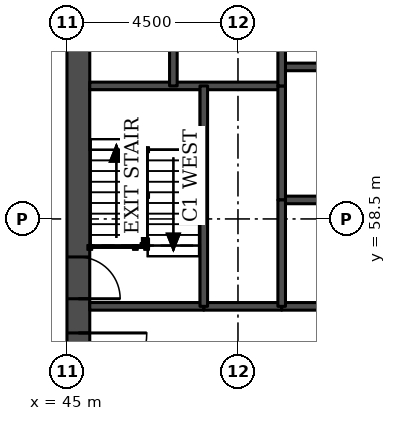
"""IFC4 building model, lengths in metres.
Left out: names, types, materials, properties, quantities, classifications, styles, units other than length and angle.
Written with IfcOpenShell. Run it as: python <this file> out.ifc"""

import sys

from ifc_helpers import new_model, si_unit, direction, frame, frame_2d, origin, place, context, subcontext, project, spatial, rectangle, extrude, element, fill, save


model = new_model("IFC4")
c1 = context("Model", 3, precision=1e-05, world=origin(), true_north=direction((0.0, 1.0)))
c2 = subcontext(c1, "Body", "Model", "MODEL_VIEW")
j1 = project(units=[si_unit("LENGTHUNIT", "METRE"), si_unit("PLANEANGLEUNIT", "RADIAN")], contexts=[c1])
p1 = place(None, origin())
s1 = spatial("IfcSite", under=j1, at=p1, CompositionType="ELEMENT")
p2 = place(p1, origin())
s2 = spatial("IfcBuilding", under=s1, at=p2, CompositionType="ELEMENT")
p3 = place(p2, frame((0.0, 0.0, 8.0)))
s3 = spatial("IfcBuildingStorey", under=s2, at=p3, CompositionType="ELEMENT", Elevation=8.0)
p4 = place(p3, frame((45.3, 49.5, 0.0), z_axis=(0.0, 0.0, 1.0), x_axis=(0.0, 1.0, 0.0)))
e1 = element("IfcWall", 1, at=p4, inside=s3, PredefinedType="SHEAR", context=c2, shape_type="SweptSolid", body=[
    extrude(rectangle(XDim=22.5, YDim=0.6, at=frame_2d((11.25, 0.0))), origin(), (0.0, 0.0, 1.0), 5.5),
])
p5 = place(p4, frame((4.2, 0.0, 0.0)))
e2 = element("IfcOpeningElement", 2, at=p5, cuts=e1, PredefinedType="OPENING", context=c2, shape_type="SweptSolid", body=[
    extrude(rectangle(XDim=1.8, YDim=2.1, at=frame_2d((0.9, 1.05))), frame((0.0, 0.31, 0.0), z_axis=(0.0, -1.0, 0.0), x_axis=(1.0, 0.0, 0.0)), (0.0, 0.0, 1.0), 0.62),
])
p6 = place(p4, frame((6.9, 0.0, 0.0)))
e3 = element("IfcOpeningElement", 3, at=p6, cuts=e1, PredefinedType="OPENING", context=c2, shape_type="SweptSolid", body=[
    extrude(rectangle(XDim=1.1, YDim=2.1, at=frame_2d((0.55, 1.05))), frame((0.0, 0.31, 0.0), z_axis=(0.0, -1.0, 0.0), x_axis=(1.0, 0.0, 0.0)), (0.0, 0.0, 1.0), 0.62),
])
p7 = place(p4, frame((13.6, 0.0, 0.0)))
e4 = element("IfcOpeningElement", 4, at=p7, cuts=e1, PredefinedType="OPENING", context=c2, shape_type="SweptSolid", body=[
    extrude(rectangle(XDim=1.1, YDim=2.1, at=frame_2d((0.55, 1.05))), frame((0.0, 0.31, 0.0), z_axis=(0.0, -1.0, 0.0), x_axis=(1.0, 0.0, 0.0)), (0.0, 0.0, 1.0), 0.62),
])
p8 = place(p4, frame((16.5, 0.0, 0.0)))
e5 = element("IfcOpeningElement", 5, at=p8, cuts=e1, PredefinedType="OPENING", context=c2, shape_type="SweptSolid", body=[
    extrude(rectangle(XDim=1.8, YDim=2.1, at=frame_2d((0.9, 1.05))), frame((0.0, 0.31, 0.0), z_axis=(0.0, -1.0, 0.0), x_axis=(1.0, 0.0, 0.0)), (0.0, 0.0, 1.0), 0.62),
])
p9 = place(p3, frame((48.6, 56.2, 0.0), z_axis=(0.0, 0.0, 1.0), x_axis=(1.0, 0.0, 0.0)))
e6 = element("IfcWall", 6, at=p9, inside=s3, PredefinedType="SOLIDWALL", context=c2, shape_type="SweptSolid", body=[
    extrude(rectangle(XDim=2.05, YDim=0.2, at=frame_2d((1.025, 0.0))), origin(), (0.0, 0.0, 1.0), 5.15),
])
p10 = place(p3, frame((45.6, 56.2, 0.0), z_axis=(0.0, 0.0, 1.0), x_axis=(1.0, 0.0, 0.0)))
e7 = element("IfcWall", 7, at=p10, inside=s3, PredefinedType="SOLIDWALL", context=c2, shape_type="SweptSolid", body=[
    extrude(rectangle(XDim=3.0, YDim=0.2, at=frame_2d((1.5, 0.0))), origin(), (0.0, 0.0, 1.0), 5.15),
])
p11 = place(p3, frame((50.65, 56.2, 0.0), z_axis=(0.0, 0.0, 1.0), x_axis=(1.0, 0.0, 0.0)))
e8 = element("IfcWall", 8, at=p11, inside=s3, PredefinedType="SOLIDWALL", context=c2, shape_type="SweptSolid", body=[
    extrude(rectangle(XDim=11.2, YDim=0.2, at=frame_2d((5.6, 0.0))), origin(), (0.0, 0.0, 1.0), 5.15),
])
p12 = place(p3, frame((50.65, 59.0, 0.0), z_axis=(0.0, 0.0, 1.0), x_axis=(1.0, 0.0, 0.0)))
e9 = element("IfcWall", 9, at=p12, inside=s3, PredefinedType="SOLIDWALL", context=c2, shape_type="SweptSolid", body=[
    extrude(rectangle(XDim=11.2, YDim=0.2, at=frame_2d((5.6, 0.0))), origin(), (0.0, 0.0, 1.0), 5.5),
])
p13 = place(p3, frame((45.6, 62.0, 0.0), z_axis=(0.0, 0.0, 1.0), x_axis=(1.0, 0.0, 0.0)))
e10 = element("IfcWall", 10, at=p13, inside=s3, PredefinedType="SOLIDWALL", context=c2, shape_type="SweptSolid", body=[
    extrude(rectangle(XDim=5.05, YDim=0.2, at=frame_2d((2.525, 0.0))), origin(), (0.0, 0.0, 1.0), 5.15),
])
p14 = place(p3, frame((50.65, 62.5, 0.0), z_axis=(0.0, 0.0, 1.0), x_axis=(1.0, 0.0, 0.0)))
e11 = element("IfcWall", 11, at=p14, inside=s3, PredefinedType="SOLIDWALL", context=c2, shape_type="SweptSolid", body=[
    extrude(rectangle(XDim=11.2, YDim=0.2, at=frame_2d((5.6, 0.0))), origin(), (0.0, 0.0, 1.0), 5.5),
])
p15 = place(p3, frame((47.8, 62.0, 0.0), z_axis=(0.0, 0.0, 1.0), x_axis=(0.0, 1.0, 0.0)))
e12 = element("IfcWall", 12, at=p15, inside=s3, PredefinedType="SOLIDWALL", context=c2, shape_type="SweptSolid", body=[
    extrude(rectangle(XDim=3.3, YDim=0.2, at=frame_2d((1.65, 0.0))), origin(), (0.0, 0.0, 1.0), 5.15),
])
p16 = place(p15, frame((1.1, 0.0, 0.0)))
e13 = element("IfcOpeningElement", 13, at=p16, cuts=e12, PredefinedType="OPENING", context=c2, shape_type="SweptSolid", body=[
    extrude(rectangle(XDim=1.1, YDim=2.1, at=frame_2d((0.55, 1.05))), frame((0.0, 0.11, 0.0), z_axis=(0.0, -1.0, 0.0), x_axis=(1.0, 0.0, 0.0)), (0.0, 0.0, 1.0), 0.22),
])
p17 = place(p3, frame((48.6, 56.2, 0.0), z_axis=(0.0, 0.0, 1.0), x_axis=(0.0, 1.0, 0.0)))
e14 = element("IfcWall", 14, at=p17, inside=s3, PredefinedType="SOLIDWALL", context=c2, shape_type="SweptSolid", body=[
    extrude(rectangle(XDim=5.8, YDim=0.2, at=frame_2d((2.9, 0.0))), origin(), (0.0, 0.0, 1.0), 5.15),
])
p18 = place(p3, frame((50.65, 59.0, 0.0), z_axis=(0.0, 0.0, 1.0), x_axis=(0.0, 1.0, 0.0)))
e15 = element("IfcWall", 15, at=p18, inside=s3, PredefinedType="SOLIDWALL", context=c2, shape_type="SweptSolid", body=[
    extrude(rectangle(XDim=3.0, YDim=0.2, at=frame_2d((1.5, 0.0))), origin(), (0.0, 0.0, 1.0), 5.5),
])
p19 = place(p3, frame((50.65, 56.2, 0.0), z_axis=(0.0, 0.0, 1.0), x_axis=(0.0, 1.0, 0.0)))
e16 = element("IfcWall", 16, at=p19, inside=s3, PredefinedType="SOLIDWALL", context=c2, shape_type="SweptSolid", body=[
    extrude(rectangle(XDim=2.8, YDim=0.2, at=frame_2d((1.4, 0.0))), origin(), (0.0, 0.0, 1.0), 5.15),
])
p20 = place(p3, frame((50.65, 62.0, 0.0), z_axis=(0.0, 0.0, 1.0), x_axis=(0.0, 1.0, 0.0)))
e17 = element("IfcWall", 17, at=p20, inside=s3, PredefinedType="SOLIDWALL", context=c2, shape_type="SweptSolid", body=[
    extrude(rectangle(XDim=3.3, YDim=0.2, at=frame_2d((1.65, 0.0))), origin(), (0.0, 0.0, 1.0), 5.15),
])
p21 = place(p5, frame((1.8, 0.0, 0.0), z_axis=(0.0, 0.0, 1.0), x_axis=(-1.0, 0.0, 0.0)))
e18 = element("IfcDoor", 18, at=p21, inside=s3, OperationType="SINGLE_SWING_LEFT", PredefinedType="DOOR", context=c2, shape_type="SweptSolid", body=[
    extrude(rectangle(XDim=1.8, YDim=2.1, at=frame_2d((0.9, 1.05))), frame((0.0, 0.025, 0.0), z_axis=(0.0, -1.0, 0.0), x_axis=(1.0, 0.0, 0.0)), (0.0, 0.0, 1.0), 0.05),
])
fill(e2, e18)
p22 = place(p6, frame((1.1, 0.0, 0.0), z_axis=(0.0, 0.0, 1.0), x_axis=(-1.0, 0.0, 0.0)))
e19 = element("IfcDoor", 19, at=p22, inside=s3, OperationType="SINGLE_SWING_RIGHT", PredefinedType="DOOR", context=c2, shape_type="SweptSolid", body=[
    extrude(rectangle(XDim=1.1, YDim=2.1, at=frame_2d((0.55, 1.05))), frame((0.0, 0.025, 0.0), z_axis=(0.0, -1.0, 0.0), x_axis=(1.0, 0.0, 0.0)), (0.0, 0.0, 1.0), 0.05),
])
fill(e3, e19)
save(model, sys.argv[1])
